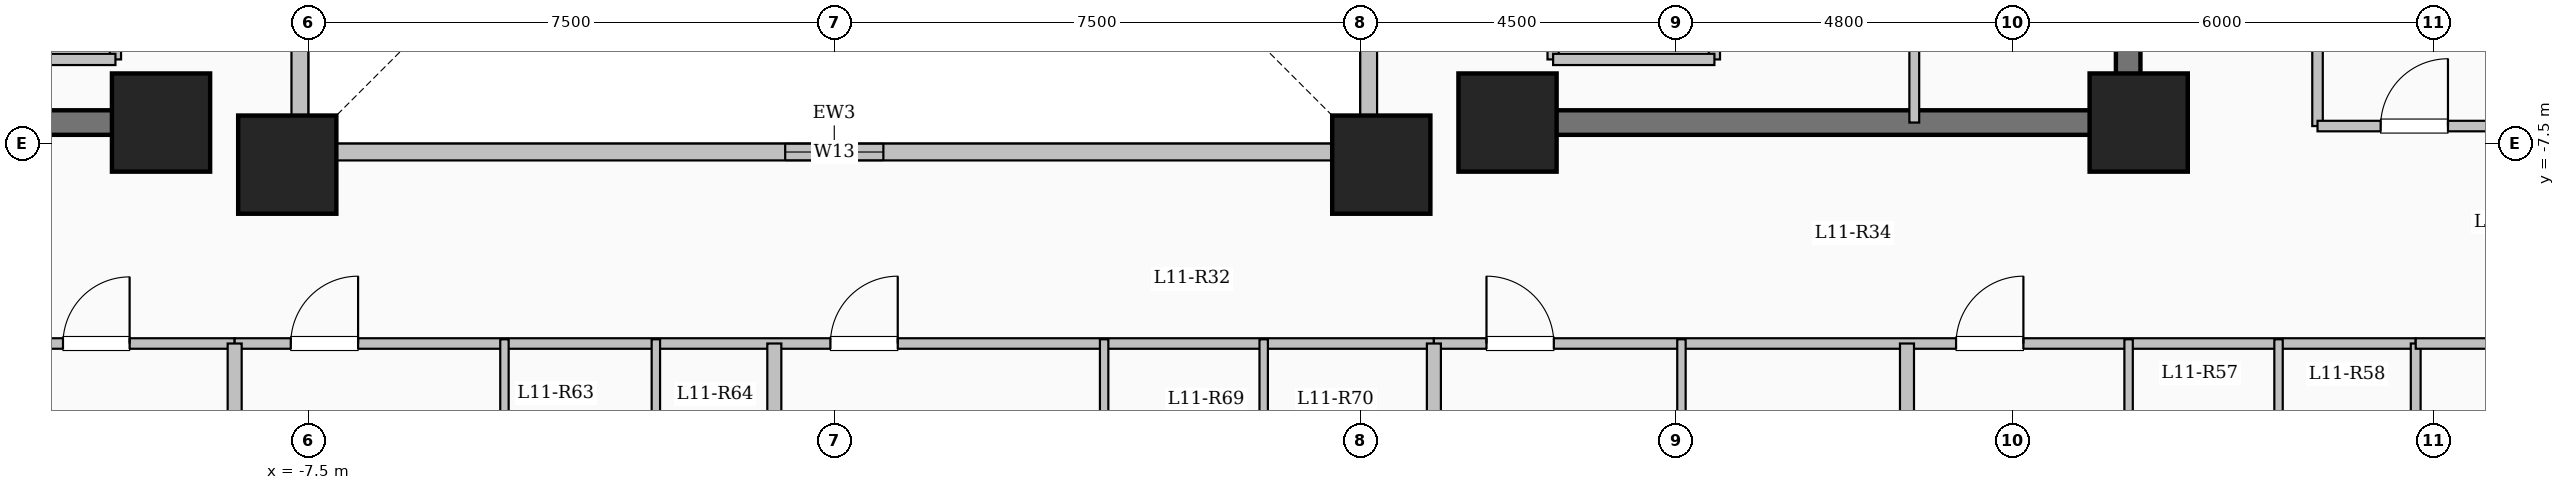
"""IFC4 building model, lengths in metres.
Left out: names, types, materials, properties, quantities, classifications, styles, units other than length and angle.
Written with IfcOpenShell. Run it as: python <this file> out.ifc"""

import sys

from ifc_helpers import new_model, si_unit, direction, frame, frame_2d, origin, origin_2d, place, context, subcontext, project, spatial, rectangle, extrude, element, fill, save


model = new_model("IFC4")
c1 = context("Model", 3, precision=1e-05, world=origin(), true_north=direction((0.0, 1.0)))
c2 = subcontext(c1, "Body", "Model", "MODEL_VIEW")
j1 = project(units=[si_unit("LENGTHUNIT", "METRE"), si_unit("PLANEANGLEUNIT", "RADIAN")], contexts=[c1])
p1 = place(None, origin())
s1 = spatial("IfcSite", under=j1, at=p1, CompositionType="ELEMENT")
p2 = place(p1, origin())
s2 = spatial("IfcBuilding", under=s1, at=p2, CompositionType="ELEMENT")
p3 = place(p2, frame((0.0, 0.0, 44.1)))
s3 = spatial("IfcBuildingStorey", under=s2, at=p3, CompositionType="ELEMENT", Elevation=44.1)
for number, where, z_axis, x_axis in (
    (1, (-7.8, -7.8, 0.0), (0.0, 0.0, 1.0), (1.0, 0.0, 0.0)),
    (2, (7.8, -7.8, 0.0), (0.0, 0.0, 1.0), (1.0, 0.0, 0.0)),
    (3, (-9.6, -7.2, 0.0), (0.0, 0.0, 1.0), (1.0, 0.0, 0.0)),
    (4, (9.6, -7.2, 0.0), (0.0, 0.0, 1.0), (1.0, 0.0, 0.0)),
    (5, (18.6, -7.2, 0.0), (0.0, 0.0, 1.0), (1.0, 0.0, 0.0)),
):
    element("IfcColumn", number, at=place(p3, frame(where, z_axis=z_axis, x_axis=x_axis)), inside=s3, PredefinedType="COLUMN", context=c2, shape_type="SweptSolid", body=[
        extrude(rectangle(XDim=1.4, YDim=1.4, at=origin_2d()), origin(), (0.0, 0.0, 1.0), 3.35),
    ])
p4 = place(p3, frame((-7.62, -7.62, 0.0), z_axis=(0.0, 0.0, 1.0), x_axis=(1.0, 0.0, 0.0)))
e6 = element("IfcWall", 6, at=p4, inside=s3, PredefinedType="SOLIDWALL", context=c2, shape_type="SweptSolid", body=[
    extrude(rectangle(XDim=15.24, YDim=0.24, at=frame_2d((7.62, 0.0))), origin(), (0.0, 0.0, 1.0), 3.1),
])
p5 = place(p4, frame((6.92, 0.0, 0.95)))
e7 = element("IfcOpeningElement", 7, at=p5, cuts=e6, PredefinedType="OPENING", context=c2, shape_type="SweptSolid", body=[
    extrude(rectangle(XDim=1.4, YDim=1.5, at=frame_2d((0.7, 0.75))), frame((0.0, 0.13, 0.0), z_axis=(0.0, -1.0, 0.0), x_axis=(1.0, 0.0, 0.0)), (0.0, 0.0, 1.0), 0.26),
])
p6 = place(p3, frame((7.62, -7.62, 0.0), z_axis=(0.0, 0.0, 1.0), x_axis=(0.0, 1.0, 0.0)))
e8 = element("IfcWall", 8, at=p6, inside=s3, PredefinedType="SOLIDWALL", context=c2, shape_type="SweptSolid", body=[
    extrude(rectangle(XDim=15.24, YDim=0.24, at=frame_2d((7.62, 0.0))), origin(), (0.0, 0.0, 1.0), 3.1),
])
p7 = place(p6, frame((6.92, 0.0, 0.95)))
e9 = element("IfcOpeningElement", 9, at=p7, cuts=e8, PredefinedType="OPENING", context=c2, shape_type="SweptSolid", body=[
    extrude(rectangle(XDim=1.4, YDim=1.5, at=frame_2d((0.7, 0.75))), frame((0.0, 0.13, 0.0), z_axis=(0.0, -1.0, 0.0), x_axis=(1.0, 0.0, 0.0)), (0.0, 0.0, 1.0), 0.26),
])
p8 = place(p3, frame((-7.62, 7.62, 0.0), z_axis=(0.0, 0.0, 1.0), x_axis=(0.0, -1.0, 0.0)))
e10 = element("IfcWall", 10, at=p8, inside=s3, PredefinedType="SOLIDWALL", context=c2, shape_type="SweptSolid", body=[
    extrude(rectangle(XDim=15.24, YDim=0.24, at=frame_2d((7.62, 0.0))), origin(), (0.0, 0.0, 1.0), 3.1),
])
p9 = place(p8, frame((6.92, 0.0, 0.95)))
e11 = element("IfcOpeningElement", 11, at=p9, cuts=e10, PredefinedType="OPENING", context=c2, shape_type="SweptSolid", body=[
    extrude(rectangle(XDim=1.4, YDim=1.5, at=frame_2d((0.7, 0.75))), frame((0.0, 0.13, 0.0), z_axis=(0.0, -1.0, 0.0), x_axis=(1.0, 0.0, 0.0)), (0.0, 0.0, 1.0), 0.26),
])
p10 = place(p3, frame((-10.25, -6.3, 0.0), z_axis=(0.0, 0.0, 1.0), x_axis=(0.0, 1.0, 0.0)))
e12 = element("IfcWall", 12, at=p10, inside=s3, PredefinedType="SOLIDWALL", context=c2, shape_type="SweptSolid", body=[
    extrude(rectangle(XDim=2.6, YDim=0.16, at=frame_2d((1.3, 0.0))), origin(), (0.0, 0.0, 1.0), 3.1),
])
p11 = place(p10, frame((0.75, 0.0, 0.0)))
e13 = element("IfcOpeningElement", 13, at=p11, cuts=e12, PredefinedType="OPENING", context=c2, shape_type="SweptSolid", body=[
    extrude(rectangle(XDim=1.1, YDim=2.15, at=frame_2d((0.55, 1.075))), frame((0.0, 0.09, 0.0), z_axis=(0.0, -1.0, 0.0), x_axis=(1.0, 0.0, 0.0)), (0.0, 0.0, 1.0), 0.18),
])
p12 = place(p3, frame((-12.55, -6.3, 0.0), z_axis=(0.0, 0.0, 1.0), x_axis=(1.0, 0.0, 0.0)))
e14 = element("IfcWall", 14, at=p12, inside=s3, PredefinedType="SOLIDWALL", context=c2, shape_type="SweptSolid", body=[
    extrude(rectangle(XDim=2.3, YDim=0.16, at=frame_2d((1.15, 0.0))), origin(), (0.0, 0.0, 1.0), 3.1),
])
for number, where, z_axis, x_axis in (
    (15, (10.25, -6.3, 0.0), (0.0, 0.0, 1.0), (0.0, 1.0, 0.0)),
    (16, (12.55, -6.3, 0.0), (0.0, 0.0, 1.0), (0.0, 1.0, 0.0)),
):
    element("IfcWall", number, at=place(p3, frame(where, z_axis=z_axis, x_axis=x_axis)), inside=s3, PredefinedType="SOLIDWALL", context=c2, shape_type="SweptSolid", body=[
        extrude(rectangle(XDim=2.6, YDim=0.16, at=frame_2d((1.3, 0.0))), origin(), (0.0, 0.0, 1.0), 3.1),
    ])
p13 = place(p3, frame((10.25, -6.3, 0.0), z_axis=(0.0, 0.0, 1.0), x_axis=(1.0, 0.0, 0.0)))
e17 = element("IfcWall", 17, at=p13, inside=s3, PredefinedType="SOLIDWALL", context=c2, shape_type="SweptSolid", body=[
    extrude(rectangle(XDim=2.3, YDim=0.16, at=frame_2d((1.15, 0.0))), origin(), (0.0, 0.0, 1.0), 3.1),
])
p14 = place(p3, frame((-18.625, -7.2, 0.0), z_axis=(0.0, 0.0, 1.0), x_axis=(1.0, 0.0, 0.0)))
e18 = element("IfcWall", 18, at=p14, inside=s3, PredefinedType="SHEAR", context=c2, shape_type="SweptSolid", body=[
    extrude(rectangle(XDim=8.55, YDim=0.35, at=frame_2d((4.275, 0.0))), origin(), (0.0, 0.0, 1.0), 3.35),
])
p15 = place(p3, frame((18.45, -7.375, 0.0), z_axis=(0.0, 0.0, 1.0), x_axis=(0.0, 1.0, 0.0)))
e19 = element("IfcWall", 19, at=p15, inside=s3, PredefinedType="SHEAR", context=c2, shape_type="SweptSolid", body=[
    extrude(rectangle(XDim=14.05, YDim=0.35, at=frame_2d((7.025, 0.0))), origin(), (0.0, 0.0, 1.0), 3.35),
])
p16 = place(p3, frame((10.075, -7.2, 0.0), z_axis=(0.0, 0.0, 1.0), x_axis=(1.0, 0.0, 0.0)))
e20 = element("IfcWall", 20, at=p16, inside=s3, PredefinedType="SHEAR", context=c2, shape_type="SweptSolid", body=[
    extrude(rectangle(XDim=8.55, YDim=0.35, at=frame_2d((4.275, 0.0))), origin(), (0.0, 0.0, 1.0), 3.35),
])
p17 = place(p3, frame((15.4, -7.2, 0.0), z_axis=(0.0, 0.0, 1.0), x_axis=(0.0, 1.0, 0.0)))
e21 = element("IfcWall", 21, at=p17, inside=s3, PredefinedType="PARTITIONING", context=c2, shape_type="SweptSolid", body=[
    extrude(rectangle(XDim=10.45, YDim=0.14, at=frame_2d((5.225, 0.0))), origin(), (0.0, 0.0, 1.0), 3.1),
])
p18 = place(p17, frame((9.25, 0.0, 0.0)))
e22 = element("IfcOpeningElement", 22, at=p18, cuts=e21, PredefinedType="OPENING", context=c2, shape_type="SweptSolid", body=[
    extrude(rectangle(XDim=0.9, YDim=2.08, at=frame_2d((0.45, 1.04))), frame((0.0, 0.08, 0.0), z_axis=(0.0, -1.0, 0.0), x_axis=(1.0, 0.0, 0.0)), (0.0, 0.0, 1.0), 0.16),
])
p19 = place(p3, frame((21.15, -7.25, 0.0), z_axis=(0.0, 0.0, 1.0), x_axis=(0.0, 1.0, 0.0)))
e23 = element("IfcWall", 23, at=p19, inside=s3, PredefinedType="PARTITIONING", context=c2, shape_type="SweptSolid", body=[
    extrude(rectangle(XDim=18.0, YDim=0.15, at=frame_2d((9.0, 0.0))), origin(), (0.0, 0.0, 1.0), 2.585),
])
p20 = place(p3, frame((-22.55, -10.35, 0.0), z_axis=(0.0, 0.0, 1.0), x_axis=(1.0, 0.0, 0.0)))
e24 = element("IfcWall", 24, at=p20, inside=s3, PredefinedType="PARTITIONING", context=c2, shape_type="SweptSolid", body=[
    extrude(rectangle(XDim=14.0, YDim=0.15, at=frame_2d((7.0, 0.0))), origin(), (0.0, 0.0, 1.0), 3.1),
])
p21 = place(p20, frame((2.006, 0.0, 0.0)))
e25 = element("IfcOpeningElement", 25, at=p21, cuts=e24, PredefinedType="OPENING", context=c2, shape_type="SweptSolid", body=[
    extrude(rectangle(XDim=0.95, YDim=2.15, at=frame_2d((0.475, 1.075))), frame((0.0, 0.085, 0.0), z_axis=(0.0, -1.0, 0.0), x_axis=(1.0, 0.0, 0.0)), (0.0, 0.0, 1.0), 0.17),
])
p22 = place(p20, frame((7.058, 0.0, 0.0)))
e26 = element("IfcOpeningElement", 26, at=p22, cuts=e24, PredefinedType="OPENING", context=c2, shape_type="SweptSolid", body=[
    extrude(rectangle(XDim=0.95, YDim=2.15, at=frame_2d((0.475, 1.075))), frame((0.0, 0.085, 0.0), z_axis=(0.0, -1.0, 0.0), x_axis=(1.0, 0.0, 0.0)), (0.0, 0.0, 1.0), 0.17),
])
p23 = place(p20, frame((11.552, 0.0, 0.0)))
e27 = element("IfcOpeningElement", 27, at=p23, cuts=e24, PredefinedType="OPENING", context=c2, shape_type="SweptSolid", body=[
    extrude(rectangle(XDim=0.95, YDim=2.15, at=frame_2d((0.475, 1.075))), frame((0.0, 0.085, 0.0), z_axis=(0.0, -1.0, 0.0), x_axis=(1.0, 0.0, 0.0)), (0.0, 0.0, 1.0), 0.17),
])
p24 = place(p3, frame((-8.55, -10.35, 0.0), z_axis=(0.0, 0.0, 1.0), x_axis=(1.0, 0.0, 0.0)))
e28 = element("IfcWall", 28, at=p24, inside=s3, PredefinedType="PARTITIONING", context=c2, shape_type="SweptSolid", body=[
    extrude(rectangle(XDim=17.1, YDim=0.15, at=frame_2d((8.55, 0.0))), origin(), (0.0, 0.0, 1.0), 3.1),
])
p25 = place(p24, frame((0.8, 0.0, 0.0)))
e29 = element("IfcOpeningElement", 29, at=p25, cuts=e28, PredefinedType="OPENING", context=c2, shape_type="SweptSolid", body=[
    extrude(rectangle(XDim=0.96, YDim=2.15, at=frame_2d((0.48, 1.075))), frame((0.0, 0.085, 0.0), z_axis=(0.0, -1.0, 0.0), x_axis=(1.0, 0.0, 0.0)), (0.0, 0.0, 1.0), 0.17),
])
p26 = place(p24, frame((8.495, 0.0, 0.0)))
e30 = element("IfcOpeningElement", 30, at=p26, cuts=e28, PredefinedType="OPENING", context=c2, shape_type="SweptSolid", body=[
    extrude(rectangle(XDim=0.96, YDim=2.15, at=frame_2d((0.48, 1.075))), frame((0.0, 0.085, 0.0), z_axis=(0.0, -1.0, 0.0), x_axis=(1.0, 0.0, 0.0)), (0.0, 0.0, 1.0), 0.17),
])
p27 = place(p3, frame((8.55, -10.35, 0.0), z_axis=(0.0, 0.0, 1.0), x_axis=(1.0, 0.0, 0.0)))
e31 = element("IfcWall", 31, at=p27, inside=s3, PredefinedType="PARTITIONING", context=c2, shape_type="SweptSolid", body=[
    extrude(rectangle(XDim=14.0, YDim=0.15, at=frame_2d((7.0, 0.0))), origin(), (0.0, 0.0, 1.0), 3.1),
])
p28 = place(p27, frame((0.75, 0.0, 0.0)))
e32 = element("IfcOpeningElement", 32, at=p28, cuts=e31, PredefinedType="OPENING", context=c2, shape_type="SweptSolid", body=[
    extrude(rectangle(XDim=0.96, YDim=2.15, at=frame_2d((0.48, 1.075))), frame((0.0, 0.085, 0.0), z_axis=(0.0, -1.0, 0.0), x_axis=(1.0, 0.0, 0.0)), (0.0, 0.0, 1.0), 0.17),
])
p29 = place(p27, frame((7.446, 0.0, 0.0)))
e33 = element("IfcOpeningElement", 33, at=p29, cuts=e31, PredefinedType="OPENING", context=c2, shape_type="SweptSolid", body=[
    extrude(rectangle(XDim=0.96, YDim=2.15, at=frame_2d((0.48, 1.075))), frame((0.0, 0.085, 0.0), z_axis=(0.0, -1.0, 0.0), x_axis=(1.0, 0.0, 0.0)), (0.0, 0.0, 1.0), 0.17),
])
p30 = place(p3, frame((15.296, -23.6, 0.0), z_axis=(0.0, 0.0, 1.0), x_axis=(0.0, 1.0, 0.0)))
e34 = element("IfcWall", 34, at=p30, inside=s3, PredefinedType="SOLIDWALL", context=c2, shape_type="SweptSolid", body=[
    extrude(rectangle(XDim=13.25, YDim=0.2, at=frame_2d((6.625, 0.0))), origin(), (0.0, 0.0, 1.0), 2.435),
])
p31 = place(p3, frame((12.08, -13.51, 0.0), z_axis=(0.0, 0.0, 1.0), x_axis=(0.0, 1.0, 0.0)))
e35 = element("IfcWall", 35, at=p31, inside=s3, PredefinedType="PARTITIONING", context=c2, shape_type="SweptSolid", body=[
    extrude(rectangle(XDim=3.22, YDim=0.12, at=frame_2d((1.61, 0.0))), origin(), (0.0, 0.0, 1.0), 3.1),
])
p32 = place(p31, frame((1.14, 0.0, 0.0)))
e36 = element("IfcOpeningElement", 36, at=p32, cuts=e35, PredefinedType="OPENING", context=c2, shape_type="SweptSolid", body=[
    extrude(rectangle(XDim=0.88, YDim=2.1, at=frame_2d((0.44, 1.05))), frame((0.0, 0.07, 0.0), z_axis=(0.0, -1.0, 0.0), x_axis=(1.0, 0.0, 0.0)), (0.0, 0.0, 1.0), 0.14),
])
p33 = place(p3, frame((18.456, -23.6, 0.0), z_axis=(0.0, 0.0, 1.0), x_axis=(0.0, 1.0, 0.0)))
e37 = element("IfcWall", 37, at=p33, inside=s3, PredefinedType="PARTITIONING", context=c2, shape_type="SweptSolid", body=[
    extrude(rectangle(XDim=13.31, YDim=0.12, at=frame_2d((6.655, 0.0))), origin(), (0.0, 0.0, 1.0), 3.1),
])
p34 = place(p33, frame((9.485, 0.0, 0.0)))
e38 = element("IfcOpeningElement", 38, at=p34, cuts=e37, PredefinedType="OPENING", context=c2, shape_type="SweptSolid", body=[
    extrude(rectangle(XDim=1.08, YDim=2.15, at=frame_2d((0.54, 1.075))), frame((0.0, 0.07, 0.0), z_axis=(0.0, -1.0, 0.0), x_axis=(1.0, 0.0, 0.0)), (0.0, 0.0, 1.0), 0.14),
])
p35 = place(p3, frame((20.594, -12.75, 0.0), z_axis=(0.0, 0.0, 1.0), x_axis=(0.0, 1.0, 0.0)))
e39 = element("IfcWall", 39, at=p35, inside=s3, PredefinedType="PARTITIONING", context=c2, shape_type="SweptSolid", body=[
    extrude(rectangle(XDim=2.46, YDim=0.12, at=frame_2d((1.23, 0.0))), origin(), (0.0, 0.0, 1.0), 3.1),
])
for number, where, z_axis, x_axis in (
    (40, (-8.55, -24.204, 0.0), (0.0, 0.0, 1.0), (0.0, 1.0, 0.0)),
    (41, (8.55, -24.204, 0.0), (0.0, 0.0, 1.0), (0.0, 1.0, 0.0)),
):
    element("IfcWall", number, at=place(p3, frame(where, z_axis=z_axis, x_axis=x_axis)), inside=s3, PredefinedType="SOLIDWALL", context=c2, shape_type="SweptSolid", body=[
        extrude(rectangle(XDim=13.854, YDim=0.2, at=frame_2d((6.927, 0.0))), origin(), (0.0, 0.0, 1.0), 3.1),
    ])
p36 = place(p3, frame((-0.855, -25.08, 0.0), z_axis=(0.0, 0.0, 1.0), x_axis=(0.0, 1.0, 0.0)))
e42 = element("IfcWall", 42, at=p36, inside=s3, PredefinedType="SOLIDWALL", context=c2, shape_type="SweptSolid", body=[
    extrude(rectangle(XDim=14.73, YDim=0.2, at=frame_2d((7.365, 0.0))), origin(), (0.0, 0.0, 1.0), 3.1),
])
p37 = place(p3, frame((-4.703, -25.08, 0.0), z_axis=(0.0, 0.0, 1.0), x_axis=(0.0, 1.0, 0.0)))
e43 = element("IfcWall", 43, at=p37, inside=s3, PredefinedType="PARTITIONING", context=c2, shape_type="SweptSolid", body=[
    extrude(rectangle(XDim=14.79, YDim=0.12, at=frame_2d((7.395, 0.0))), origin(), (0.0, 0.0, 1.0), 3.1),
])
p38 = place(p37, frame((10.795, 0.0, 0.0)))
e44 = element("IfcOpeningElement", 44, at=p38, cuts=e43, PredefinedType="OPENING", context=c2, shape_type="SweptSolid", body=[
    extrude(rectangle(XDim=1.08, YDim=2.15, at=frame_2d((0.54, 1.075))), frame((0.0, 0.07, 0.0), z_axis=(0.0, -1.0, 0.0), x_axis=(1.0, 0.0, 0.0)), (0.0, 0.0, 1.0), 0.14),
])
p39 = place(p3, frame((-2.544, -12.92, 0.0), z_axis=(0.0, 0.0, 1.0), x_axis=(0.0, 1.0, 0.0)))
e45 = element("IfcWall", 45, at=p39, inside=s3, PredefinedType="PARTITIONING", context=c2, shape_type="SweptSolid", body=[
    extrude(rectangle(XDim=2.63, YDim=0.12, at=frame_2d((1.315, 0.0))), origin(), (0.0, 0.0, 1.0), 3.1),
])
p40 = place(p3, frame((3.848, -25.08, 0.0), z_axis=(0.0, 0.0, 1.0), x_axis=(0.0, 1.0, 0.0)))
e46 = element("IfcWall", 46, at=p40, inside=s3, PredefinedType="PARTITIONING", context=c2, shape_type="SweptSolid", body=[
    extrude(rectangle(XDim=14.79, YDim=0.12, at=frame_2d((7.395, 0.0))), origin(), (0.0, 0.0, 1.0), 3.1),
])
p41 = place(p40, frame((10.625, 0.0, 0.0)))
e47 = element("IfcOpeningElement", 47, at=p41, cuts=e46, PredefinedType="OPENING", context=c2, shape_type="SweptSolid", body=[
    extrude(rectangle(XDim=1.08, YDim=2.15, at=frame_2d((0.54, 1.075))), frame((0.0, 0.07, 0.0), z_axis=(0.0, -1.0, 0.0), x_axis=(1.0, 0.0, 0.0)), (0.0, 0.0, 1.0), 0.14),
])
p42 = place(p3, frame((6.123, -13.09, 0.0), z_axis=(0.0, 0.0, 1.0), x_axis=(0.0, 1.0, 0.0)))
e48 = element("IfcWall", 48, at=p42, inside=s3, PredefinedType="PARTITIONING", context=c2, shape_type="SweptSolid", body=[
    extrude(rectangle(XDim=2.8, YDim=0.12, at=frame_2d((1.4, 0.0))), origin(), (0.0, 0.0, 1.0), 3.1),
])
p43 = place(p3, frame((21.15, -7.25, 0.0), z_axis=(0.0, 0.0, 1.0), x_axis=(1.0, 0.0, 0.0)))
e49 = element("IfcWall", 49, at=p43, inside=s3, PredefinedType="PARTITIONING", context=c2, shape_type="SweptSolid", body=[
    extrude(rectangle(XDim=7.53, YDim=0.15, at=frame_2d((3.765, 0.0))), origin(), (0.0, 0.0, 1.0), 3.1),
])
p44 = place(p43, frame((0.9, 0.0, 0.0)))
e50 = element("IfcOpeningElement", 50, at=p44, cuts=e49, PredefinedType="OPENING", context=c2, shape_type="SweptSolid", body=[
    extrude(rectangle(XDim=0.96, YDim=2.15, at=frame_2d((0.48, 1.075))), frame((0.0, 0.085, 0.0), z_axis=(0.0, -1.0, 0.0), x_axis=(1.0, 0.0, 0.0)), (0.0, 0.0, 1.0), 0.17),
])
p45 = place(p3, frame((22.55, -19.05, 0.0), z_axis=(0.0, 0.0, 1.0), x_axis=(0.0, 1.0, 0.0)))
e51 = element("IfcWall", 51, at=p45, inside=s3, PredefinedType="PARTITIONING", context=c2, shape_type="SweptSolid", body=[
    extrude(rectangle(XDim=8.7, YDim=0.14, at=frame_2d((4.35, 0.0))), origin(), (0.0, 0.0, 1.0), 3.1),
])
p46 = place(p3, frame((22.55, -10.35, 0.0), z_axis=(0.0, 0.0, 1.0), x_axis=(1.0, 0.0, 0.0)))
e52 = element("IfcWall", 52, at=p46, inside=s3, PredefinedType="PARTITIONING", context=c2, shape_type="SweptSolid", body=[
    extrude(rectangle(XDim=6.13, YDim=0.15, at=frame_2d((3.065, 0.0))), origin(), (0.0, 0.0, 1.0), 3.1),
])
p47 = place(p46, frame((2.59, 0.0, 0.0)))
e53 = element("IfcOpeningElement", 53, at=p47, cuts=e52, PredefinedType="OPENING", context=c2, shape_type="SweptSolid", body=[
    extrude(rectangle(XDim=0.95, YDim=2.15, at=frame_2d((0.475, 1.075))), frame((0.0, 0.085, 0.0), z_axis=(0.0, -1.0, 0.0), x_axis=(1.0, 0.0, 0.0)), (0.0, 0.0, 1.0), 0.17),
])
p48 = place(p5, origin())
e54 = element("IfcWindow", 54, at=p48, inside=s3, PartitioningType="SINGLE_PANEL", PredefinedType="WINDOW", context=c2, shape_type="SweptSolid", body=[
    extrude(rectangle(XDim=1.4, YDim=1.5, at=frame_2d((0.7, 0.75))), frame((0.0, 0.03, 0.0), z_axis=(0.0, -1.0, 0.0), x_axis=(1.0, 0.0, 0.0)), (0.0, 0.0, 1.0), 0.06),
])
fill(e7, e54)
p49 = place(p23, origin())
e55 = element("IfcDoor", 55, at=p49, inside=s3, OperationType="SINGLE_SWING_RIGHT", PredefinedType="DOOR", context=c2, shape_type="SweptSolid", body=[
    extrude(rectangle(XDim=0.95, YDim=2.15, at=frame_2d((0.475, 1.075))), frame((0.0, 0.025, 0.0), z_axis=(0.0, -1.0, 0.0), x_axis=(1.0, 0.0, 0.0)), (0.0, 0.0, 1.0), 0.05),
])
fill(e27, e55)
p50 = place(p28, origin())
e56 = element("IfcDoor", 56, at=p50, inside=s3, OperationType="SINGLE_SWING_LEFT", PredefinedType="DOOR", context=c2, shape_type="SweptSolid", body=[
    extrude(rectangle(XDim=0.96, YDim=2.15, at=frame_2d((0.48, 1.075))), frame((0.0, 0.025, 0.0), z_axis=(0.0, -1.0, 0.0), x_axis=(1.0, 0.0, 0.0)), (0.0, 0.0, 1.0), 0.05),
])
fill(e32, e56)
p51 = place(p29, origin())
e57 = element("IfcDoor", 57, at=p51, inside=s3, OperationType="SINGLE_SWING_RIGHT", PredefinedType="DOOR", context=c2, shape_type="SweptSolid", body=[
    extrude(rectangle(XDim=0.96, YDim=2.15, at=frame_2d((0.48, 1.075))), frame((0.0, 0.025, 0.0), z_axis=(0.0, -1.0, 0.0), x_axis=(1.0, 0.0, 0.0)), (0.0, 0.0, 1.0), 0.05),
])
fill(e33, e57)
p52 = place(p25, origin())
e58 = element("IfcDoor", 58, at=p52, inside=s3, OperationType="SINGLE_SWING_RIGHT", PredefinedType="DOOR", context=c2, shape_type="SweptSolid", body=[
    extrude(rectangle(XDim=0.96, YDim=2.15, at=frame_2d((0.48, 1.075))), frame((0.0, 0.025, 0.0), z_axis=(0.0, -1.0, 0.0), x_axis=(1.0, 0.0, 0.0)), (0.0, 0.0, 1.0), 0.05),
])
fill(e29, e58)
p53 = place(p26, origin())
e59 = element("IfcDoor", 59, at=p53, inside=s3, OperationType="SINGLE_SWING_RIGHT", PredefinedType="DOOR", context=c2, shape_type="SweptSolid", body=[
    extrude(rectangle(XDim=0.96, YDim=2.15, at=frame_2d((0.48, 1.075))), frame((0.0, 0.025, 0.0), z_axis=(0.0, -1.0, 0.0), x_axis=(1.0, 0.0, 0.0)), (0.0, 0.0, 1.0), 0.05),
])
fill(e30, e59)
p54 = place(p44, origin())
e60 = element("IfcDoor", 60, at=p54, inside=s3, OperationType="SINGLE_SWING_RIGHT", PredefinedType="DOOR", context=c2, shape_type="SweptSolid", body=[
    extrude(rectangle(XDim=0.96, YDim=2.15, at=frame_2d((0.48, 1.075))), frame((0.0, 0.025, 0.0), z_axis=(0.0, -1.0, 0.0), x_axis=(1.0, 0.0, 0.0)), (0.0, 0.0, 1.0), 0.05),
])
fill(e50, e60)
save(model, sys.argv[1])
